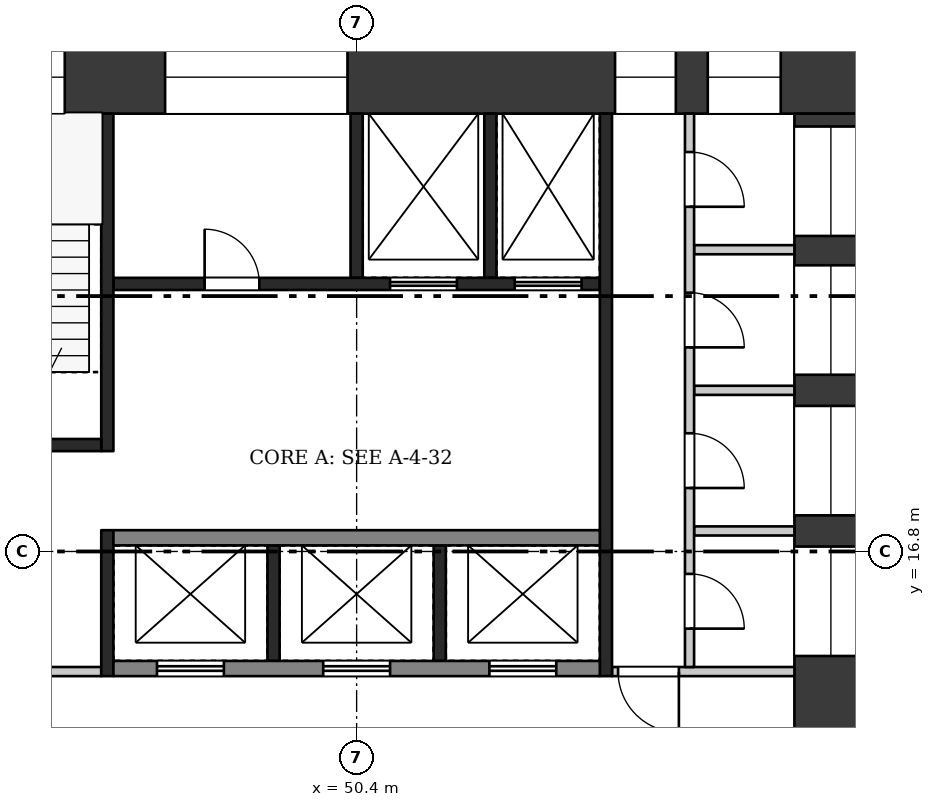
"""IFC4 building model, lengths in metres.
Left out: names, types, materials, properties, quantities, classifications, styles, units other than length and angle.
Written with IfcOpenShell. Run it as: python <this file> out.ifc"""

import sys

from ifc_helpers import new_model, si_unit, direction, frame, frame_2d, origin, place, context, subcontext, project, spatial, rectangle, extrude, element, fill, save


model = new_model("IFC4")
c1 = context("Model", 3, precision=1e-05, world=origin(), true_north=direction((0.0, 1.0)))
c2 = subcontext(c1, "Body", "Model", "MODEL_VIEW")
j1 = project(units=[si_unit("LENGTHUNIT", "METRE"), si_unit("PLANEANGLEUNIT", "RADIAN")], contexts=[c1])
p1 = place(None, origin())
s1 = spatial("IfcSite", under=j1, at=p1, CompositionType="ELEMENT")
p2 = place(p1, origin())
s2 = spatial("IfcBuilding", under=s1, at=p2, CompositionType="ELEMENT")
p3 = place(p2, frame((0.0, 0.0, 235.2)))
s3 = spatial("IfcBuildingStorey", under=s2, at=p3, CompositionType="ELEMENT", Elevation=235.2)
p4 = place(p3, frame((42.0, 24.6, 0.0), z_axis=(0.0, 0.0, 1.0), x_axis=(1.0, 0.0, 0.0)))
e1 = element("IfcWall", 1, at=p4, inside=s3, PredefinedType="SHEAR", context=c2, shape_type="SweptSolid", body=[
    extrude(rectangle(XDim=16.8, YDim=1.2, at=frame_2d((8.4, 0.0))), origin(), (0.0, 0.0, 1.0), 3.22),
])
p5 = place(p4, frame((1.8, 0.0, 0.5)))
e2 = element("IfcOpeningElement", 2, at=p5, cuts=e1, PredefinedType="OPENING", context=c2, shape_type="SweptSolid", body=[
    extrude(rectangle(XDim=1.8, YDim=2.4, at=frame_2d((0.9, 1.2))), frame((0.0, 0.61, 0.0), z_axis=(0.0, -1.0, 0.0), x_axis=(1.0, 0.0, 0.0)), (0.0, 0.0, 1.0), 1.22),
])
p6 = place(p4, frame((5.25, 0.0, 1.6)))
e3 = element("IfcOpeningElement", 3, at=p6, cuts=e1, PredefinedType="OPENING", context=c2, shape_type="SweptSolid", body=[
    extrude(rectangle(XDim=3.0, YDim=1.2, at=frame_2d((1.5, 0.6))), frame((0.0, 0.61, 0.0), z_axis=(0.0, -1.0, 0.0), x_axis=(1.0, 0.0, 0.0)), (0.0, 0.0, 1.0), 1.22),
])
p7 = place(p4, frame((12.65, 0.0, 0.6)))
e4 = element("IfcOpeningElement", 4, at=p7, cuts=e1, PredefinedType="OPENING", context=c2, shape_type="SweptSolid", body=[
    extrude(rectangle(XDim=1.0, YDim=2.1, at=frame_2d((0.5, 1.05))), frame((0.0, 0.61, 0.0), z_axis=(0.0, -1.0, 0.0), x_axis=(1.0, 0.0, 0.0)), (0.0, 0.0, 1.0), 1.22),
])
p8 = place(p4, frame((14.175, 0.0, 1.6)))
e5 = element("IfcOpeningElement", 5, at=p8, cuts=e1, PredefinedType="OPENING", context=c2, shape_type="SweptSolid", body=[
    extrude(rectangle(XDim=1.2, YDim=1.2, at=frame_2d((0.6, 0.6))), frame((0.0, 0.61, 0.0), z_axis=(0.0, -1.0, 0.0), x_axis=(1.0, 0.0, 0.0)), (0.0, 0.0, 1.0), 1.22),
])
p9 = place(p3, frame((58.2, 9.6, 0.0), z_axis=(0.0, 0.0, 1.0), x_axis=(0.0, 1.0, 0.0)))
e6 = element("IfcWall", 6, at=p9, inside=s3, PredefinedType="SHEAR", context=c2, shape_type="SweptSolid", body=[
    extrude(rectangle(XDim=14.4, YDim=1.2, at=frame_2d((7.2, 0.0))), origin(), (0.0, 0.0, 1.0), 3.22),
])
p10 = place(p9, frame((1.105, 0.0, 0.6)))
e7 = element("IfcOpeningElement", 7, at=p10, cuts=e6, PredefinedType="OPENING", context=c2, shape_type="SweptSolid", body=[
    extrude(rectangle(XDim=3.0, YDim=2.1, at=frame_2d((1.5, 1.05))), frame((0.0, 0.61, 0.0), z_axis=(0.0, -1.0, 0.0), x_axis=(1.0, 0.0, 0.0)), (0.0, 0.0, 1.0), 1.22),
])
p11 = place(p9, frame((5.481, 0.0, 1.6)))
e8 = element("IfcOpeningElement", 8, at=p11, cuts=e6, PredefinedType="OPENING", context=c2, shape_type="SweptSolid", body=[
    extrude(rectangle(XDim=1.8, YDim=1.2, at=frame_2d((0.9, 0.6))), frame((0.0, 0.61, 0.0), z_axis=(0.0, -1.0, 0.0), x_axis=(1.0, 0.0, 0.0)), (0.0, 0.0, 1.0), 1.22),
])
p12 = place(p9, frame((7.794, 0.0, 1.6)))
e9 = element("IfcOpeningElement", 9, at=p12, cuts=e6, PredefinedType="OPENING", context=c2, shape_type="SweptSolid", body=[
    extrude(rectangle(XDim=1.8, YDim=1.2, at=frame_2d((0.9, 0.6))), frame((0.0, 0.61, 0.0), z_axis=(0.0, -1.0, 0.0), x_axis=(1.0, 0.0, 0.0)), (0.0, 0.0, 1.0), 1.22),
])
p13 = place(p9, frame((10.106, 0.0, 1.6)))
e10 = element("IfcOpeningElement", 10, at=p13, cuts=e6, PredefinedType="OPENING", context=c2, shape_type="SweptSolid", body=[
    extrude(rectangle(XDim=1.8, YDim=1.2, at=frame_2d((0.9, 0.6))), frame((0.0, 0.61, 0.0), z_axis=(0.0, -1.0, 0.0), x_axis=(1.0, 0.0, 0.0)), (0.0, 0.0, 1.0), 1.22),
])
p14 = place(p9, frame((12.389, 0.0, 1.6)))
e11 = element("IfcOpeningElement", 11, at=p14, cuts=e6, PredefinedType="OPENING", context=c2, shape_type="SweptSolid", body=[
    extrude(rectangle(XDim=1.8, YDim=1.2, at=frame_2d((0.9, 0.6))), frame((0.0, 0.61, 0.0), z_axis=(0.0, -1.0, 0.0), x_axis=(1.0, 0.0, 0.0)), (0.0, 0.0, 1.0), 1.22),
])
for number, where, z_axis, x_axis in (
    (12, (49.033, 15.0, 0.0), (0.0, 0.0, 1.0), (0.0, 1.0, 0.0)),
    (13, (51.767, 15.0, 0.0), (0.0, 0.0, 1.0), (0.0, 1.0, 0.0)),
):
    element("IfcWall", number, at=place(p3, frame(where, z_axis=z_axis, x_axis=x_axis)), inside=s3, PredefinedType="SHEAR", context=c2, shape_type="SweptSolid", body=[
        extrude(rectangle(XDim=1.9, YDim=0.2, at=frame_2d((0.95, 0.0))), origin(), (0.0, 0.0, 1.0), 3.22),
    ])
p15 = place(p3, frame((46.4, 14.875, 0.0), z_axis=(0.0, 0.0, 1.0), x_axis=(1.0, 0.0, 0.0)))
e14 = element("IfcWall", 14, at=p15, inside=s3, PredefinedType="SHEAR", context=c2, shape_type="SweptSolid", body=[
    extrude(rectangle(XDim=8.0, YDim=0.25, at=frame_2d((4.0, 0.0))), origin(), (0.0, 0.0, 1.0), 3.22),
])
p16 = place(p15, frame((0.717, 0.0, 0.0)))
e15 = element("IfcOpeningElement", 15, at=p16, cuts=e14, PredefinedType="OPENING", context=c2, shape_type="SweptSolid", body=[
    extrude(rectangle(XDim=1.1, YDim=2.1, at=frame_2d((0.55, 1.05))), frame((0.0, 0.135, 0.0), z_axis=(0.0, -1.0, 0.0), x_axis=(1.0, 0.0, 0.0)), (0.0, 0.0, 1.0), 0.27),
])
p17 = place(p15, frame((3.45, 0.0, 0.0)))
e16 = element("IfcOpeningElement", 16, at=p17, cuts=e14, PredefinedType="OPENING", context=c2, shape_type="SweptSolid", body=[
    extrude(rectangle(XDim=1.1, YDim=2.1, at=frame_2d((0.55, 1.05))), frame((0.0, 0.135, 0.0), z_axis=(0.0, -1.0, 0.0), x_axis=(1.0, 0.0, 0.0)), (0.0, 0.0, 1.0), 0.27),
])
p18 = place(p15, frame((6.183, 0.0, 0.0)))
e17 = element("IfcOpeningElement", 17, at=p18, cuts=e14, PredefinedType="OPENING", context=c2, shape_type="SweptSolid", body=[
    extrude(rectangle(XDim=1.1, YDim=2.1, at=frame_2d((0.55, 1.05))), frame((0.0, 0.135, 0.0), z_axis=(0.0, -1.0, 0.0), x_axis=(1.0, 0.0, 0.0)), (0.0, 0.0, 1.0), 0.27),
])
p19 = place(p3, frame((46.4, 17.025, 0.0), z_axis=(0.0, 0.0, 1.0), x_axis=(1.0, 0.0, 0.0)))
e18 = element("IfcWall", 18, at=p19, inside=s3, PredefinedType="SHEAR", context=c2, shape_type="SweptSolid", body=[
    extrude(rectangle(XDim=8.0, YDim=0.25, at=frame_2d((4.0, 0.0))), origin(), (0.0, 0.0, 1.0), 3.22),
])
for number, where, z_axis, x_axis in (
    (19, (50.4, 21.3, 0.0), (0.0, 0.0, 1.0), (0.0, 1.0, 0.0)),
    (20, (52.6, 21.3, 0.0), (0.0, 0.0, 1.0), (0.0, 1.0, 0.0)),
):
    element("IfcWall", number, at=place(p3, frame(where, z_axis=z_axis, x_axis=x_axis)), inside=s3, PredefinedType="SHEAR", context=c2, shape_type="SweptSolid", body=[
        extrude(rectangle(XDim=2.7, YDim=0.2, at=frame_2d((1.35, 0.0))), origin(), (0.0, 0.0, 1.0), 3.22),
    ])
p20 = place(p3, frame((46.4, 21.2, 0.0), z_axis=(0.0, 0.0, 1.0), x_axis=(1.0, 0.0, 0.0)))
e21 = element("IfcWall", 21, at=p20, inside=s3, PredefinedType="SHEAR", context=c2, shape_type="SweptSolid", body=[
    extrude(rectangle(XDim=8.0, YDim=0.2, at=frame_2d((4.0, 0.0))), origin(), (0.0, 0.0, 1.0), 3.22),
])
p21 = place(p20, frame((1.5, 0.0, 0.0)))
e22 = element("IfcOpeningElement", 22, at=p21, cuts=e21, PredefinedType="OPENING", context=c2, shape_type="SweptSolid", body=[
    extrude(rectangle(XDim=0.9, YDim=2.1, at=frame_2d((0.45, 1.05))), frame((0.0, 0.11, 0.0), z_axis=(0.0, -1.0, 0.0), x_axis=(1.0, 0.0, 0.0)), (0.0, 0.0, 1.0), 0.22),
])
p22 = place(p20, frame((4.55, 0.0, 0.0)))
e23 = element("IfcOpeningElement", 23, at=p22, cuts=e21, PredefinedType="OPENING", context=c2, shape_type="SweptSolid", body=[
    extrude(rectangle(XDim=1.1, YDim=2.1, at=frame_2d((0.55, 1.05))), frame((0.0, 0.11, 0.0), z_axis=(0.0, -1.0, 0.0), x_axis=(1.0, 0.0, 0.0)), (0.0, 0.0, 1.0), 0.22),
])
p23 = place(p20, frame((6.6, 0.0, 0.0)))
e24 = element("IfcOpeningElement", 24, at=p23, cuts=e21, PredefinedType="OPENING", context=c2, shape_type="SweptSolid", body=[
    extrude(rectangle(XDim=1.1, YDim=2.1, at=frame_2d((0.55, 1.05))), frame((0.0, 0.11, 0.0), z_axis=(0.0, -1.0, 0.0), x_axis=(1.0, 0.0, 0.0)), (0.0, 0.0, 1.0), 0.22),
])
p24 = place(p3, frame((46.3, 14.75, 0.0), z_axis=(0.0, 0.0, 1.0), x_axis=(0.0, 1.0, 0.0)))
e25 = element("IfcWall", 25, at=p24, inside=s3, PredefinedType="SHEAR", context=c2, shape_type="SweptSolid", body=[
    extrude(rectangle(XDim=2.4, YDim=0.2, at=frame_2d((1.2, 0.0))), origin(), (0.0, 0.0, 1.0), 3.22),
])
p25 = place(p3, frame((46.3, 18.45, 0.0), z_axis=(0.0, 0.0, 1.0), x_axis=(0.0, 1.0, 0.0)))
e26 = element("IfcWall", 26, at=p25, inside=s3, PredefinedType="SHEAR", context=c2, shape_type="SweptSolid", body=[
    extrude(rectangle(XDim=5.55, YDim=0.2, at=frame_2d((2.775, 0.0))), origin(), (0.0, 0.0, 1.0), 3.22),
])
p26 = place(p3, frame((43.2, 14.825, 0.0), z_axis=(0.0, 0.0, 1.0), x_axis=(1.0, 0.0, 0.0)))
e27 = element("IfcWall", 27, at=p26, inside=s3, PredefinedType="PARTITIONING", context=c2, shape_type="SweptSolid", body=[
    extrude(rectangle(XDim=3.0, YDim=0.15, at=frame_2d((1.5, 0.0))), origin(), (0.0, 0.0, 1.0), 3.22),
])
p27 = place(p26, frame((1.0, 0.0, 0.0)))
e28 = element("IfcOpeningElement", 28, at=p27, cuts=e27, PredefinedType="OPENING", context=c2, shape_type="SweptSolid", body=[
    extrude(rectangle(XDim=1.0, YDim=2.1, at=frame_2d((0.5, 1.05))), frame((0.0, 0.085, 0.0), z_axis=(0.0, -1.0, 0.0), x_axis=(1.0, 0.0, 0.0)), (0.0, 0.0, 1.0), 0.17),
])
p28 = place(p3, frame((43.2, 18.55, 0.0), z_axis=(0.0, 0.0, 1.0), x_axis=(1.0, 0.0, 0.0)))
e29 = element("IfcWall", 29, at=p28, inside=s3, PredefinedType="SHEAR", context=c2, shape_type="SweptSolid", body=[
    extrude(rectangle(XDim=3.0, YDim=0.2, at=frame_2d((1.5, 0.0))), origin(), (0.0, 0.0, 1.0), 3.22),
])
p29 = place(p28, frame((1.0, 0.0, 0.0)))
e30 = element("IfcOpeningElement", 30, at=p29, cuts=e29, PredefinedType="OPENING", context=c2, shape_type="SweptSolid", body=[
    extrude(rectangle(XDim=1.0, YDim=2.1, at=frame_2d((0.5, 1.05))), frame((0.0, 0.11, 0.0), z_axis=(0.0, -1.0, 0.0), x_axis=(1.0, 0.0, 0.0)), (0.0, 0.0, 1.0), 0.22),
])
p30 = place(p3, frame((54.5, 14.75, 0.0), z_axis=(0.0, 0.0, 1.0), x_axis=(0.0, 1.0, 0.0)))
e31 = element("IfcWall", 31, at=p30, inside=s3, PredefinedType="SHEAR", context=c2, shape_type="SweptSolid", body=[
    extrude(rectangle(XDim=9.25, YDim=0.2, at=frame_2d((4.625, 0.0))), origin(), (0.0, 0.0, 1.0), 3.22),
])
p31 = place(p3, frame((54.6, 14.825, 0.0), z_axis=(0.0, 0.0, 1.0), x_axis=(1.0, 0.0, 0.0)))
e32 = element("IfcWall", 32, at=p31, inside=s3, PredefinedType="PARTITIONING", context=c2, shape_type="SweptSolid", body=[
    extrude(rectangle(XDim=3.0, YDim=0.15, at=frame_2d((1.5, 0.0))), origin(), (0.0, 0.0, 1.0), 3.22),
])
p32 = place(p31, frame((0.1, 0.0, 0.0)))
e33 = element("IfcOpeningElement", 33, at=p32, cuts=e32, PredefinedType="OPENING", context=c2, shape_type="SweptSolid", body=[
    extrude(rectangle(XDim=1.0, YDim=2.1, at=frame_2d((0.5, 1.05))), frame((0.0, 0.085, 0.0), z_axis=(0.0, -1.0, 0.0), x_axis=(1.0, 0.0, 0.0)), (0.0, 0.0, 1.0), 0.17),
])
for number, where, z_axis, x_axis in (
    (34, (55.95, 17.137, 0.0), (0.0, 0.0, 1.0), (1.0, 0.0, 0.0)),
    (35, (55.95, 19.45, 0.0), (0.0, 0.0, 1.0), (1.0, 0.0, 0.0)),
    (36, (55.95, 21.762, 0.0), (0.0, 0.0, 1.0), (1.0, 0.0, 0.0)),
):
    element("IfcWall", number, at=place(p3, frame(where, z_axis=z_axis, x_axis=x_axis)), inside=s3, PredefinedType="PARTITIONING", context=c2, shape_type="SweptSolid", body=[
        extrude(rectangle(XDim=1.65, YDim=0.15, at=frame_2d((0.825, 0.0))), origin(), (0.0, 0.0, 1.0), 3.22),
    ])
p33 = place(p3, frame((55.875, 14.9, 0.0), z_axis=(0.0, 0.0, 1.0), x_axis=(0.0, 1.0, 0.0)))
e37 = element("IfcWall", 37, at=p33, inside=s3, PredefinedType="PARTITIONING", context=c2, shape_type="SweptSolid", body=[
    extrude(rectangle(XDim=9.1, YDim=0.15, at=frame_2d((4.55, 0.0))), origin(), (0.0, 0.0, 1.0), 3.22),
])
p34 = place(p33, frame((0.631, 0.0, 0.0)))
e38 = element("IfcOpeningElement", 38, at=p34, cuts=e37, PredefinedType="OPENING", context=c2, shape_type="SweptSolid", body=[
    extrude(rectangle(XDim=0.9, YDim=2.1, at=frame_2d((0.45, 1.05))), frame((0.0, 0.085, 0.0), z_axis=(0.0, -1.0, 0.0), x_axis=(1.0, 0.0, 0.0)), (0.0, 0.0, 1.0), 0.17),
])
p35 = place(p33, frame((2.944, 0.0, 0.0)))
e39 = element("IfcOpeningElement", 39, at=p35, cuts=e37, PredefinedType="OPENING", context=c2, shape_type="SweptSolid", body=[
    extrude(rectangle(XDim=0.9, YDim=2.1, at=frame_2d((0.45, 1.05))), frame((0.0, 0.085, 0.0), z_axis=(0.0, -1.0, 0.0), x_axis=(1.0, 0.0, 0.0)), (0.0, 0.0, 1.0), 0.17),
])
p36 = place(p33, frame((5.256, 0.0, 0.0)))
e40 = element("IfcOpeningElement", 40, at=p36, cuts=e37, PredefinedType="OPENING", context=c2, shape_type="SweptSolid", body=[
    extrude(rectangle(XDim=0.9, YDim=2.1, at=frame_2d((0.45, 1.05))), frame((0.0, 0.085, 0.0), z_axis=(0.0, -1.0, 0.0), x_axis=(1.0, 0.0, 0.0)), (0.0, 0.0, 1.0), 0.17),
])
p37 = place(p33, frame((7.569, 0.0, 0.0)))
e41 = element("IfcOpeningElement", 41, at=p37, cuts=e37, PredefinedType="OPENING", context=c2, shape_type="SweptSolid", body=[
    extrude(rectangle(XDim=0.9, YDim=2.1, at=frame_2d((0.45, 1.05))), frame((0.0, 0.085, 0.0), z_axis=(0.0, -1.0, 0.0), x_axis=(1.0, 0.0, 0.0)), (0.0, 0.0, 1.0), 0.17),
])
p38 = place(p16, origin())
e42 = element("IfcDoor", 42, at=p38, inside=s3, OperationType="DOUBLE_DOOR_SLIDING", PredefinedType="DOOR", context=c2, shape_type="SweptSolid", body=[
    extrude(rectangle(XDim=1.1, YDim=2.1, at=frame_2d((0.55, 1.05))), frame((0.0, 0.025, 0.0), z_axis=(0.0, -1.0, 0.0), x_axis=(1.0, 0.0, 0.0)), (0.0, 0.0, 1.0), 0.05),
])
fill(e15, e42)
p39 = place(p17, origin())
e43 = element("IfcDoor", 43, at=p39, inside=s3, OperationType="DOUBLE_DOOR_SLIDING", PredefinedType="DOOR", context=c2, shape_type="SweptSolid", body=[
    extrude(rectangle(XDim=1.1, YDim=2.1, at=frame_2d((0.55, 1.05))), frame((0.0, 0.025, 0.0), z_axis=(0.0, -1.0, 0.0), x_axis=(1.0, 0.0, 0.0)), (0.0, 0.0, 1.0), 0.05),
])
fill(e16, e43)
p40 = place(p18, origin())
e44 = element("IfcDoor", 44, at=p40, inside=s3, OperationType="DOUBLE_DOOR_SLIDING", PredefinedType="DOOR", context=c2, shape_type="SweptSolid", body=[
    extrude(rectangle(XDim=1.1, YDim=2.1, at=frame_2d((0.55, 1.05))), frame((0.0, 0.025, 0.0), z_axis=(0.0, -1.0, 0.0), x_axis=(1.0, 0.0, 0.0)), (0.0, 0.0, 1.0), 0.05),
])
fill(e17, e44)
p41 = place(p21, origin())
e45 = element("IfcDoor", 45, at=p41, inside=s3, OperationType="SINGLE_SWING_LEFT", PredefinedType="DOOR", context=c2, shape_type="SweptSolid", body=[
    extrude(rectangle(XDim=0.9, YDim=2.1, at=frame_2d((0.45, 1.05))), frame((0.0, 0.025, 0.0), z_axis=(0.0, -1.0, 0.0), x_axis=(1.0, 0.0, 0.0)), (0.0, 0.0, 1.0), 0.05),
])
fill(e22, e45)
p42 = place(p22, origin())
e46 = element("IfcDoor", 46, at=p42, inside=s3, OperationType="DOUBLE_DOOR_SLIDING", PredefinedType="DOOR", context=c2, shape_type="SweptSolid", body=[
    extrude(rectangle(XDim=1.1, YDim=2.1, at=frame_2d((0.55, 1.05))), frame((0.0, 0.025, 0.0), z_axis=(0.0, -1.0, 0.0), x_axis=(1.0, 0.0, 0.0)), (0.0, 0.0, 1.0), 0.05),
])
fill(e23, e46)
p43 = place(p23, origin())
e47 = element("IfcDoor", 47, at=p43, inside=s3, OperationType="DOUBLE_DOOR_SLIDING", PredefinedType="DOOR", context=c2, shape_type="SweptSolid", body=[
    extrude(rectangle(XDim=1.1, YDim=2.1, at=frame_2d((0.55, 1.05))), frame((0.0, 0.025, 0.0), z_axis=(0.0, -1.0, 0.0), x_axis=(1.0, 0.0, 0.0)), (0.0, 0.0, 1.0), 0.05),
])
fill(e24, e47)
p44 = place(p32, frame((1.0, 0.0, 0.0), z_axis=(0.0, 0.0, 1.0), x_axis=(-1.0, 0.0, 0.0)))
e48 = element("IfcDoor", 48, at=p44, inside=s3, OperationType="SINGLE_SWING_LEFT", PredefinedType="DOOR", context=c2, shape_type="SweptSolid", body=[
    extrude(rectangle(XDim=1.0, YDim=2.1, at=frame_2d((0.5, 1.05))), frame((0.0, 0.025, 0.0), z_axis=(0.0, -1.0, 0.0), x_axis=(1.0, 0.0, 0.0)), (0.0, 0.0, 1.0), 0.05),
])
fill(e33, e48)
p45 = place(p34, frame((0.9, 0.0, 0.0), z_axis=(0.0, 0.0, 1.0), x_axis=(-1.0, 0.0, 0.0)))
e49 = element("IfcDoor", 49, at=p45, inside=s3, OperationType="SINGLE_SWING_RIGHT", PredefinedType="DOOR", context=c2, shape_type="SweptSolid", body=[
    extrude(rectangle(XDim=0.9, YDim=2.1, at=frame_2d((0.45, 1.05))), frame((0.0, 0.025, 0.0), z_axis=(0.0, -1.0, 0.0), x_axis=(1.0, 0.0, 0.0)), (0.0, 0.0, 1.0), 0.05),
])
fill(e38, e49)
p46 = place(p35, frame((0.9, 0.0, 0.0), z_axis=(0.0, 0.0, 1.0), x_axis=(-1.0, 0.0, 0.0)))
e50 = element("IfcDoor", 50, at=p46, inside=s3, OperationType="SINGLE_SWING_RIGHT", PredefinedType="DOOR", context=c2, shape_type="SweptSolid", body=[
    extrude(rectangle(XDim=0.9, YDim=2.1, at=frame_2d((0.45, 1.05))), frame((0.0, 0.025, 0.0), z_axis=(0.0, -1.0, 0.0), x_axis=(1.0, 0.0, 0.0)), (0.0, 0.0, 1.0), 0.05),
])
fill(e39, e50)
p47 = place(p36, frame((0.9, 0.0, 0.0), z_axis=(0.0, 0.0, 1.0), x_axis=(-1.0, 0.0, 0.0)))
e51 = element("IfcDoor", 51, at=p47, inside=s3, OperationType="SINGLE_SWING_RIGHT", PredefinedType="DOOR", context=c2, shape_type="SweptSolid", body=[
    extrude(rectangle(XDim=0.9, YDim=2.1, at=frame_2d((0.45, 1.05))), frame((0.0, 0.025, 0.0), z_axis=(0.0, -1.0, 0.0), x_axis=(1.0, 0.0, 0.0)), (0.0, 0.0, 1.0), 0.05),
])
fill(e40, e51)
p48 = place(p37, frame((0.9, 0.0, 0.0), z_axis=(0.0, 0.0, 1.0), x_axis=(-1.0, 0.0, 0.0)))
e52 = element("IfcDoor", 52, at=p48, inside=s3, OperationType="SINGLE_SWING_RIGHT", PredefinedType="DOOR", context=c2, shape_type="SweptSolid", body=[
    extrude(rectangle(XDim=0.9, YDim=2.1, at=frame_2d((0.45, 1.05))), frame((0.0, 0.025, 0.0), z_axis=(0.0, -1.0, 0.0), x_axis=(1.0, 0.0, 0.0)), (0.0, 0.0, 1.0), 0.05),
])
fill(e41, e52)
p49 = place(p5, origin())
e53 = element("IfcWindow", 53, at=p49, inside=s3, PartitioningType="SINGLE_PANEL", PredefinedType="WINDOW", context=c2, shape_type="SweptSolid", body=[
    extrude(rectangle(XDim=1.8, YDim=2.4, at=frame_2d((0.9, 1.2))), frame((0.0, 0.03, 0.0), z_axis=(0.0, -1.0, 0.0), x_axis=(1.0, 0.0, 0.0)), (0.0, 0.0, 1.0), 0.06),
])
fill(e2, e53)
p50 = place(p6, origin())
e54 = element("IfcWindow", 54, at=p50, inside=s3, PartitioningType="SINGLE_PANEL", PredefinedType="WINDOW", context=c2, shape_type="SweptSolid", body=[
    extrude(rectangle(XDim=3.0, YDim=1.2, at=frame_2d((1.5, 0.6))), frame((0.0, 0.03, 0.0), z_axis=(0.0, -1.0, 0.0), x_axis=(1.0, 0.0, 0.0)), (0.0, 0.0, 1.0), 0.06),
])
fill(e3, e54)
p51 = place(p7, origin())
e55 = element("IfcWindow", 55, at=p51, inside=s3, PartitioningType="SINGLE_PANEL", PredefinedType="WINDOW", context=c2, shape_type="SweptSolid", body=[
    extrude(rectangle(XDim=1.0, YDim=2.1, at=frame_2d((0.5, 1.05))), frame((0.0, 0.03, 0.0), z_axis=(0.0, -1.0, 0.0), x_axis=(1.0, 0.0, 0.0)), (0.0, 0.0, 1.0), 0.06),
])
fill(e4, e55)
p52 = place(p8, origin())
e56 = element("IfcWindow", 56, at=p52, inside=s3, PartitioningType="SINGLE_PANEL", PredefinedType="WINDOW", context=c2, shape_type="SweptSolid", body=[
    extrude(rectangle(XDim=1.2, YDim=1.2, at=frame_2d((0.6, 0.6))), frame((0.0, 0.03, 0.0), z_axis=(0.0, -1.0, 0.0), x_axis=(1.0, 0.0, 0.0)), (0.0, 0.0, 1.0), 0.06),
])
fill(e5, e56)
p53 = place(p11, origin())
e57 = element("IfcWindow", 57, at=p53, inside=s3, PartitioningType="SINGLE_PANEL", PredefinedType="WINDOW", context=c2, shape_type="SweptSolid", body=[
    extrude(rectangle(XDim=1.8, YDim=1.2, at=frame_2d((0.9, 0.6))), frame((0.0, 0.03, 0.0), z_axis=(0.0, -1.0, 0.0), x_axis=(1.0, 0.0, 0.0)), (0.0, 0.0, 1.0), 0.06),
])
fill(e8, e57)
p54 = place(p12, origin())
e58 = element("IfcWindow", 58, at=p54, inside=s3, PartitioningType="SINGLE_PANEL", PredefinedType="WINDOW", context=c2, shape_type="SweptSolid", body=[
    extrude(rectangle(XDim=1.8, YDim=1.2, at=frame_2d((0.9, 0.6))), frame((0.0, 0.03, 0.0), z_axis=(0.0, -1.0, 0.0), x_axis=(1.0, 0.0, 0.0)), (0.0, 0.0, 1.0), 0.06),
])
fill(e9, e58)
p55 = place(p13, origin())
e59 = element("IfcWindow", 59, at=p55, inside=s3, PartitioningType="SINGLE_PANEL", PredefinedType="WINDOW", context=c2, shape_type="SweptSolid", body=[
    extrude(rectangle(XDim=1.8, YDim=1.2, at=frame_2d((0.9, 0.6))), frame((0.0, 0.03, 0.0), z_axis=(0.0, -1.0, 0.0), x_axis=(1.0, 0.0, 0.0)), (0.0, 0.0, 1.0), 0.06),
])
fill(e10, e59)
p56 = place(p14, origin())
e60 = element("IfcWindow", 60, at=p56, inside=s3, PartitioningType="SINGLE_PANEL", PredefinedType="WINDOW", context=c2, shape_type="SweptSolid", body=[
    extrude(rectangle(XDim=1.8, YDim=1.2, at=frame_2d((0.9, 0.6))), frame((0.0, 0.03, 0.0), z_axis=(0.0, -1.0, 0.0), x_axis=(1.0, 0.0, 0.0)), (0.0, 0.0, 1.0), 0.06),
])
fill(e11, e60)
save(model, sys.argv[1])
